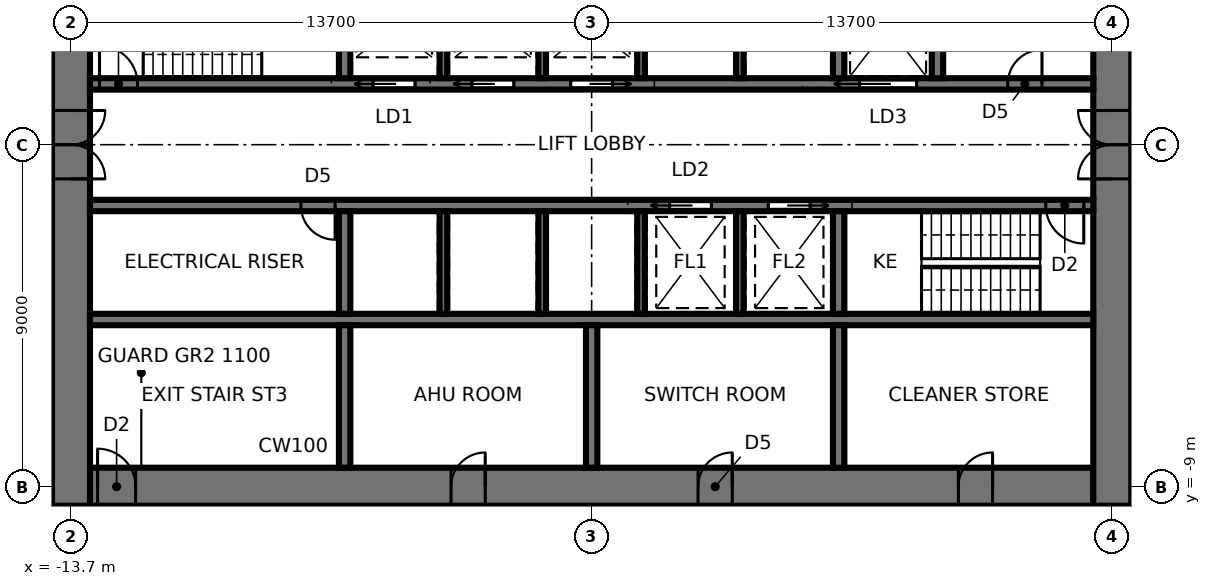
"""IFC4 building model, lengths in metres.
Left out: names, types, materials, properties, quantities, classifications, styles, units other than length and angle.
Written with IfcOpenShell. Run it as: python <this file> out.ifc"""

import sys

from ifc_helpers import new_model, si_unit, direction, frame, frame_2d, origin, place, context, subcontext, project, spatial, rectangle, extrude, element, fill, save


model = new_model("IFC4")
c1 = context("Model", 3, precision=1e-05, world=origin(), true_north=direction((0.0, 1.0)))
c2 = subcontext(c1, "Body", "Model", "MODEL_VIEW")
j1 = project(units=[si_unit("LENGTHUNIT", "METRE"), si_unit("PLANEANGLEUNIT", "RADIAN")], contexts=[c1])
p1 = place(None, origin())
s1 = spatial("IfcSite", under=j1, at=p1, CompositionType="ELEMENT")
p2 = place(p1, origin())
s2 = spatial("IfcBuilding", under=s1, at=p2, CompositionType="ELEMENT")
p3 = place(p2, frame((0.0, 0.0, 15.1)))
s3 = spatial("IfcBuildingStorey", under=s2, at=p3, CompositionType="ELEMENT", Elevation=15.1)
p4 = place(p3, frame((-13.2, -9.0, 0.0), z_axis=(0.0, 0.0, 1.0), x_axis=(1.0, 0.0, 0.0)))
e1 = element("IfcWall", 1, at=p4, inside=s3, PredefinedType="SHEAR", context=c2, shape_type="SweptSolid", body=[
    extrude(rectangle(XDim=26.4, YDim=1.0, at=frame_2d((13.2, 0.0))), origin(), (0.0, 0.0, 1.0), 4.5),
])
p5 = place(p4, frame((0.2, 0.0, 0.0)))
e2 = element("IfcOpeningElement", 2, at=p5, cuts=e1, PredefinedType="OPENING", context=c2, shape_type="SweptSolid", body=[
    extrude(rectangle(XDim=1.0, YDim=2.1, at=frame_2d((0.5, 1.05))), frame((0.0, 0.51, 0.0), z_axis=(0.0, -1.0, 0.0), x_axis=(1.0, 0.0, 0.0)), (0.0, 0.0, 1.0), 1.02),
])
p6 = place(p4, frame((9.5, 0.0, 0.0)))
e3 = element("IfcOpeningElement", 3, at=p6, cuts=e1, PredefinedType="OPENING", context=c2, shape_type="SweptSolid", body=[
    extrude(rectangle(XDim=0.9, YDim=2.1, at=frame_2d((0.45, 1.05))), frame((0.0, 0.51, 0.0), z_axis=(0.0, -1.0, 0.0), x_axis=(1.0, 0.0, 0.0)), (0.0, 0.0, 1.0), 1.02),
])
p7 = place(p4, frame((16.0, 0.0, 0.0)))
e4 = element("IfcOpeningElement", 4, at=p7, cuts=e1, PredefinedType="OPENING", context=c2, shape_type="SweptSolid", body=[
    extrude(rectangle(XDim=0.9, YDim=2.1, at=frame_2d((0.45, 1.05))), frame((0.0, 0.51, 0.0), z_axis=(0.0, -1.0, 0.0), x_axis=(1.0, 0.0, 0.0)), (0.0, 0.0, 1.0), 1.02),
])
p8 = place(p4, frame((22.85, 0.0, 0.0)))
e5 = element("IfcOpeningElement", 5, at=p8, cuts=e1, PredefinedType="OPENING", context=c2, shape_type="SweptSolid", body=[
    extrude(rectangle(XDim=0.9, YDim=2.1, at=frame_2d((0.45, 1.05))), frame((0.0, 0.51, 0.0), z_axis=(0.0, -1.0, 0.0), x_axis=(1.0, 0.0, 0.0)), (0.0, 0.0, 1.0), 1.02),
])
p9 = place(p3, frame((13.7, -9.5, 0.0), z_axis=(0.0, 0.0, 1.0), x_axis=(0.0, 1.0, 0.0)))
e6 = element("IfcWall", 6, at=p9, inside=s3, PredefinedType="SHEAR", context=c2, shape_type="SweptSolid", body=[
    extrude(rectangle(XDim=19.0, YDim=1.0, at=frame_2d((9.5, 0.0))), origin(), (0.0, 0.0, 1.0), 4.5),
])
p10 = place(p9, frame((8.6, 0.0, 0.0)))
e7 = element("IfcOpeningElement", 7, at=p10, cuts=e6, PredefinedType="OPENING", context=c2, shape_type="SweptSolid", body=[
    extrude(rectangle(XDim=1.8, YDim=2.4, at=frame_2d((0.9, 1.2))), frame((0.0, 0.51, 0.0), z_axis=(0.0, -1.0, 0.0), x_axis=(1.0, 0.0, 0.0)), (0.0, 0.0, 1.0), 1.02),
])
p11 = place(p3, frame((-13.7, 9.5, 0.0), z_axis=(0.0, 0.0, 1.0), x_axis=(0.0, -1.0, 0.0)))
e8 = element("IfcWall", 8, at=p11, inside=s3, PredefinedType="SHEAR", context=c2, shape_type="SweptSolid", body=[
    extrude(rectangle(XDim=19.0, YDim=1.0, at=frame_2d((9.5, 0.0))), origin(), (0.0, 0.0, 1.0), 4.5),
])
p12 = place(p11, frame((8.6, 0.0, 0.0)))
e9 = element("IfcOpeningElement", 9, at=p12, cuts=e8, PredefinedType="OPENING", context=c2, shape_type="SweptSolid", body=[
    extrude(rectangle(XDim=1.8, YDim=2.4, at=frame_2d((0.9, 1.2))), frame((0.0, 0.51, 0.0), z_axis=(0.0, -1.0, 0.0), x_axis=(1.0, 0.0, 0.0)), (0.0, 0.0, 1.0), 1.02),
])
p13 = place(p3, frame((-13.2, 1.6, 0.0), z_axis=(0.0, 0.0, 1.0), x_axis=(1.0, 0.0, 0.0)))
e10 = element("IfcWall", 10, at=p13, inside=s3, PredefinedType="SHEAR", context=c2, shape_type="SweptSolid", body=[
    extrude(rectangle(XDim=26.4, YDim=0.3, at=frame_2d((13.2, 0.0))), origin(), (0.0, 0.0, 1.0), 4.5),
])
p14 = place(p13, frame((0.25, 0.0, 0.0)))
e11 = element("IfcOpeningElement", 11, at=p14, cuts=e10, PredefinedType="OPENING", context=c2, shape_type="SweptSolid", body=[
    extrude(rectangle(XDim=1.0, YDim=2.1, at=frame_2d((0.5, 1.05))), frame((0.0, 0.16, 0.0), z_axis=(0.0, -1.0, 0.0), x_axis=(1.0, 0.0, 0.0)), (0.0, 0.0, 1.0), 0.32),
])
p15 = place(p13, frame((20.25, 0.0, 0.0)))
e12 = element("IfcOpeningElement", 12, at=p15, cuts=e10, PredefinedType="OPENING", context=c2, shape_type="SweptSolid", body=[
    extrude(rectangle(XDim=1.5, YDim=2.4, at=frame_2d((0.75, 1.2))), frame((0.0, 0.16, 0.0), z_axis=(0.0, -1.0, 0.0), x_axis=(1.0, 0.0, 0.0)), (0.0, 0.0, 1.0), 0.32),
])
p16 = place(p13, frame((7.45, 0.0, 0.0)))
e13 = element("IfcOpeningElement", 13, at=p16, cuts=e10, PredefinedType="OPENING", context=c2, shape_type="SweptSolid", body=[
    extrude(rectangle(XDim=1.1, YDim=2.3, at=frame_2d((0.55, 1.15))), frame((0.0, 0.16, 0.0), z_axis=(0.0, -1.0, 0.0), x_axis=(1.0, 0.0, 0.0)), (0.0, 0.0, 1.0), 0.32),
])
p17 = place(p13, frame((10.05, 0.0, 0.0)))
e14 = element("IfcOpeningElement", 14, at=p17, cuts=e10, PredefinedType="OPENING", context=c2, shape_type="SweptSolid", body=[
    extrude(rectangle(XDim=1.1, YDim=2.3, at=frame_2d((0.55, 1.15))), frame((0.0, 0.16, 0.0), z_axis=(0.0, -1.0, 0.0), x_axis=(1.0, 0.0, 0.0)), (0.0, 0.0, 1.0), 0.32),
])
p18 = place(p13, frame((12.65, 0.0, 0.0)))
e15 = element("IfcOpeningElement", 15, at=p18, cuts=e10, PredefinedType="OPENING", context=c2, shape_type="SweptSolid", body=[
    extrude(rectangle(XDim=1.1, YDim=2.3, at=frame_2d((0.55, 1.15))), frame((0.0, 0.16, 0.0), z_axis=(0.0, -1.0, 0.0), x_axis=(1.0, 0.0, 0.0)), (0.0, 0.0, 1.0), 0.32),
])
p19 = place(p13, frame((24.15, 0.0, 0.0)))
e16 = element("IfcOpeningElement", 16, at=p19, cuts=e10, PredefinedType="OPENING", context=c2, shape_type="SweptSolid", body=[
    extrude(rectangle(XDim=0.9, YDim=2.1, at=frame_2d((0.45, 1.05))), frame((0.0, 0.16, 0.0), z_axis=(0.0, -1.0, 0.0), x_axis=(1.0, 0.0, 0.0)), (0.0, 0.0, 1.0), 0.32),
])
p20 = place(p3, frame((-13.2, -1.6, 0.0), z_axis=(0.0, 0.0, 1.0), x_axis=(1.0, 0.0, 0.0)))
e17 = element("IfcWall", 17, at=p20, inside=s3, PredefinedType="SHEAR", context=c2, shape_type="SweptSolid", body=[
    extrude(rectangle(XDim=26.4, YDim=0.3, at=frame_2d((13.2, 0.0))), origin(), (0.0, 0.0, 1.0), 4.5),
])
p21 = place(p20, frame((25.15, 0.0, 0.0)))
e18 = element("IfcOpeningElement", 18, at=p21, cuts=e17, PredefinedType="OPENING", context=c2, shape_type="SweptSolid", body=[
    extrude(rectangle(XDim=1.0, YDim=2.1, at=frame_2d((0.5, 1.05))), frame((0.0, 0.16, 0.0), z_axis=(0.0, -1.0, 0.0), x_axis=(1.0, 0.0, 0.0)), (0.0, 0.0, 1.0), 0.32),
])
p22 = place(p20, frame((15.25, 0.0, 0.0)))
e19 = element("IfcOpeningElement", 19, at=p22, cuts=e17, PredefinedType="OPENING", context=c2, shape_type="SweptSolid", body=[
    extrude(rectangle(XDim=1.1, YDim=2.3, at=frame_2d((0.55, 1.15))), frame((0.0, 0.16, 0.0), z_axis=(0.0, -1.0, 0.0), x_axis=(1.0, 0.0, 0.0)), (0.0, 0.0, 1.0), 0.32),
])
p23 = place(p20, frame((17.85, 0.0, 0.0)))
e20 = element("IfcOpeningElement", 20, at=p23, cuts=e17, PredefinedType="OPENING", context=c2, shape_type="SweptSolid", body=[
    extrude(rectangle(XDim=1.1, YDim=2.3, at=frame_2d((0.55, 1.15))), frame((0.0, 0.16, 0.0), z_axis=(0.0, -1.0, 0.0), x_axis=(1.0, 0.0, 0.0)), (0.0, 0.0, 1.0), 0.32),
])
p24 = place(p20, frame((5.55, 0.0, 0.0)))
e21 = element("IfcOpeningElement", 21, at=p24, cuts=e17, PredefinedType="OPENING", context=c2, shape_type="SweptSolid", body=[
    extrude(rectangle(XDim=0.9, YDim=2.1, at=frame_2d((0.45, 1.05))), frame((0.0, 0.16, 0.0), z_axis=(0.0, -1.0, 0.0), x_axis=(1.0, 0.0, 0.0)), (0.0, 0.0, 1.0), 0.32),
])
p25 = place(p3, frame((-13.2, -4.6, 0.0), z_axis=(0.0, 0.0, 1.0), x_axis=(1.0, 0.0, 0.0)))
e22 = element("IfcWall", 22, at=p25, inside=s3, PredefinedType="SHEAR", context=c2, shape_type="SweptSolid", body=[
    extrude(rectangle(XDim=26.4, YDim=0.3, at=frame_2d((13.2, 0.0))), origin(), (0.0, 0.0, 1.0), 4.5),
])
for number, where, z_axis, x_axis in (
    (23, (-6.5, 1.75, 0.0), (0.0, 0.0, 1.0), (0.0, 1.0, 0.0)),
    (24, (6.5, 1.75, 0.0), (0.0, 0.0, 1.0), (0.0, 1.0, 0.0)),
):
    element("IfcWall", number, at=place(p3, frame(where, z_axis=z_axis, x_axis=x_axis)), inside=s3, PredefinedType="SHEAR", context=c2, shape_type="SweptSolid", body=[
        extrude(rectangle(XDim=2.7, YDim=0.3, at=frame_2d((1.35, 0.0))), origin(), (0.0, 0.0, 1.0), 4.5),
    ])
for number, where, z_axis, x_axis in (
    (25, (-3.9, 1.75, 0.0), (0.0, 0.0, 1.0), (0.0, 1.0, 0.0)),
    (26, (-1.3, 1.75, 0.0), (0.0, 0.0, 1.0), (0.0, 1.0, 0.0)),
    (27, (1.3, 1.75, 0.0), (0.0, 0.0, 1.0), (0.0, 1.0, 0.0)),
    (28, (3.9, 1.75, 0.0), (0.0, 0.0, 1.0), (0.0, 1.0, 0.0)),
):
    element("IfcWall", number, at=place(p3, frame(where, z_axis=z_axis, x_axis=x_axis)), inside=s3, PredefinedType="SHEAR", context=c2, shape_type="SweptSolid", body=[
        extrude(rectangle(XDim=2.7, YDim=0.2, at=frame_2d((1.35, 0.0))), origin(), (0.0, 0.0, 1.0), 4.5),
    ])
p26 = place(p3, frame((-6.5, -1.75, 0.0), z_axis=(0.0, 0.0, 1.0), x_axis=(0.0, -1.0, 0.0)))
e29 = element("IfcWall", 29, at=p26, inside=s3, PredefinedType="SHEAR", context=c2, shape_type="SweptSolid", body=[
    extrude(rectangle(XDim=2.7, YDim=0.3, at=frame_2d((1.35, 0.0))), origin(), (0.0, 0.0, 1.0), 4.5),
])
p27 = place(p3, frame((-6.5, -4.75, 0.0), z_axis=(0.0, 0.0, 1.0), x_axis=(0.0, -1.0, 0.0)))
e30 = element("IfcWall", 30, at=p27, inside=s3, PredefinedType="SHEAR", context=c2, shape_type="SweptSolid", body=[
    extrude(rectangle(XDim=3.75, YDim=0.3, at=frame_2d((1.875, 0.0))), origin(), (0.0, 0.0, 1.0), 4.5),
])
p28 = place(p3, frame((6.5, -1.75, 0.0), z_axis=(0.0, 0.0, 1.0), x_axis=(0.0, -1.0, 0.0)))
e31 = element("IfcWall", 31, at=p28, inside=s3, PredefinedType="SHEAR", context=c2, shape_type="SweptSolid", body=[
    extrude(rectangle(XDim=2.7, YDim=0.3, at=frame_2d((1.35, 0.0))), origin(), (0.0, 0.0, 1.0), 4.5),
])
p29 = place(p3, frame((6.5, -4.75, 0.0), z_axis=(0.0, 0.0, 1.0), x_axis=(0.0, -1.0, 0.0)))
e32 = element("IfcWall", 32, at=p29, inside=s3, PredefinedType="SHEAR", context=c2, shape_type="SweptSolid", body=[
    extrude(rectangle(XDim=3.75, YDim=0.3, at=frame_2d((1.875, 0.0))), origin(), (0.0, 0.0, 1.0), 4.5),
])
for number, where, z_axis, x_axis in (
    (33, (-3.9, -1.75, 0.0), (0.0, 0.0, 1.0), (0.0, -1.0, 0.0)),
    (34, (-1.3, -1.75, 0.0), (0.0, 0.0, 1.0), (0.0, -1.0, 0.0)),
    (35, (1.3, -1.75, 0.0), (0.0, 0.0, 1.0), (0.0, -1.0, 0.0)),
    (36, (3.9, -1.75, 0.0), (0.0, 0.0, 1.0), (0.0, -1.0, 0.0)),
):
    element("IfcWall", number, at=place(p3, frame(where, z_axis=z_axis, x_axis=x_axis)), inside=s3, PredefinedType="SHEAR", context=c2, shape_type="SweptSolid", body=[
        extrude(rectangle(XDim=2.7, YDim=0.2, at=frame_2d((1.35, 0.0))), origin(), (0.0, 0.0, 1.0), 4.5),
    ])
p30 = place(p3, frame((0.0, -4.75, 0.0), z_axis=(0.0, 0.0, 1.0), x_axis=(0.0, -1.0, 0.0)))
e37 = element("IfcWall", 37, at=p30, inside=s3, PredefinedType="SHEAR", context=c2, shape_type="SweptSolid", body=[
    extrude(rectangle(XDim=3.75, YDim=0.3, at=frame_2d((1.875, 0.0))), origin(), (0.0, 0.0, 1.0), 4.5),
])
p31 = place(p3, frame((9.1, 1.75, 0.0), z_axis=(0.0, 0.0, 1.0), x_axis=(0.0, 1.0, 0.0)))
e38 = element("IfcWall", 38, at=p31, inside=s3, PredefinedType="SHEAR", context=c2, shape_type="SweptSolid", body=[
    extrude(rectangle(XDim=2.7, YDim=0.3, at=frame_2d((1.35, 0.0))), origin(), (0.0, 0.0, 1.0), 4.5),
])
p32 = place(p12, origin())
e39 = element("IfcDoor", 39, at=p32, inside=s3, OperationType="DOUBLE_DOOR_SINGLE_SWING", PredefinedType="DOOR", context=c2, shape_type="SweptSolid", body=[
    extrude(rectangle(XDim=1.72, YDim=2.36, at=frame_2d((0.9, 1.18))), frame((0.0, 0.025, 0.0), z_axis=(0.0, -1.0, 0.0), x_axis=(1.0, 0.0, 0.0)), (0.0, 0.0, 1.0), 0.05),
    extrude(rectangle(XDim=0.04, YDim=2.4, at=frame_2d((0.02, 1.2))), frame((0.0, 0.25, 0.0), z_axis=(0.0, -1.0, 0.0), x_axis=(1.0, 0.0, 0.0)), (0.0, 0.0, 1.0), 0.5),
    extrude(rectangle(XDim=0.04, YDim=2.4, at=frame_2d((1.78, 1.2))), frame((0.0, 0.25, 0.0), z_axis=(0.0, -1.0, 0.0), x_axis=(1.0, 0.0, 0.0)), (0.0, 0.0, 1.0), 0.5),
    extrude(rectangle(XDim=1.72, YDim=0.04, at=frame_2d((0.9, 2.38))), frame((0.0, 0.25, 0.0), z_axis=(0.0, -1.0, 0.0), x_axis=(1.0, 0.0, 0.0)), (0.0, 0.0, 1.0), 0.5),
])
fill(e9, e39)
p33 = place(p10, origin())
e40 = element("IfcDoor", 40, at=p33, inside=s3, OperationType="DOUBLE_DOOR_SINGLE_SWING", PredefinedType="DOOR", context=c2, shape_type="SweptSolid", body=[
    extrude(rectangle(XDim=1.72, YDim=2.36, at=frame_2d((0.9, 1.18))), frame((0.0, 0.025, 0.0), z_axis=(0.0, -1.0, 0.0), x_axis=(1.0, 0.0, 0.0)), (0.0, 0.0, 1.0), 0.05),
    extrude(rectangle(XDim=0.04, YDim=2.4, at=frame_2d((0.02, 1.2))), frame((0.0, 0.25, 0.0), z_axis=(0.0, -1.0, 0.0), x_axis=(1.0, 0.0, 0.0)), (0.0, 0.0, 1.0), 0.5),
    extrude(rectangle(XDim=0.04, YDim=2.4, at=frame_2d((1.78, 1.2))), frame((0.0, 0.25, 0.0), z_axis=(0.0, -1.0, 0.0), x_axis=(1.0, 0.0, 0.0)), (0.0, 0.0, 1.0), 0.5),
    extrude(rectangle(XDim=1.72, YDim=0.04, at=frame_2d((0.9, 2.38))), frame((0.0, 0.25, 0.0), z_axis=(0.0, -1.0, 0.0), x_axis=(1.0, 0.0, 0.0)), (0.0, 0.0, 1.0), 0.5),
])
fill(e7, e40)
p34 = place(p14, origin())
e41 = element("IfcDoor", 41, at=p34, inside=s3, OperationType="SINGLE_SWING_LEFT", PredefinedType="DOOR", context=c2, shape_type="SweptSolid", body=[
    extrude(rectangle(XDim=1.0, YDim=2.1, at=frame_2d((0.5, 1.05))), frame((0.0, 0.025, 0.0), z_axis=(0.0, -1.0, 0.0), x_axis=(1.0, 0.0, 0.0)), (0.0, 0.0, 1.0), 0.05),
])
fill(e11, e41)
p35 = place(p21, frame((1.0, 0.0, 0.0), z_axis=(0.0, 0.0, 1.0), x_axis=(-1.0, 0.0, 0.0)))
e42 = element("IfcDoor", 42, at=p35, inside=s3, OperationType="SINGLE_SWING_LEFT", PredefinedType="DOOR", context=c2, shape_type="SweptSolid", body=[
    extrude(rectangle(XDim=1.0, YDim=2.1, at=frame_2d((0.5, 1.05))), frame((0.0, 0.025, 0.0), z_axis=(0.0, -1.0, 0.0), x_axis=(1.0, 0.0, 0.0)), (0.0, 0.0, 1.0), 0.05),
])
fill(e18, e42)
p36 = place(p5, origin())
e43 = element("IfcDoor", 43, at=p36, inside=s3, OperationType="SINGLE_SWING_LEFT", PredefinedType="DOOR", context=c2, shape_type="SweptSolid", body=[
    extrude(rectangle(XDim=0.92, YDim=2.06, at=frame_2d((0.5, 1.03))), frame((0.0, 0.025, 0.0), z_axis=(0.0, -1.0, 0.0), x_axis=(1.0, 0.0, 0.0)), (0.0, 0.0, 1.0), 0.05),
    extrude(rectangle(XDim=0.04, YDim=2.1, at=frame_2d((0.02, 1.05))), frame((0.0, 0.25, 0.0), z_axis=(0.0, -1.0, 0.0), x_axis=(1.0, 0.0, 0.0)), (0.0, 0.0, 1.0), 0.5),
    extrude(rectangle(XDim=0.04, YDim=2.1, at=frame_2d((0.98, 1.05))), frame((0.0, 0.25, 0.0), z_axis=(0.0, -1.0, 0.0), x_axis=(1.0, 0.0, 0.0)), (0.0, 0.0, 1.0), 0.5),
    extrude(rectangle(XDim=0.92, YDim=0.04, at=frame_2d((0.5, 2.08))), frame((0.0, 0.25, 0.0), z_axis=(0.0, -1.0, 0.0), x_axis=(1.0, 0.0, 0.0)), (0.0, 0.0, 1.0), 0.5),
])
fill(e2, e43)
p37 = place(p15, origin())
e44 = element("IfcDoor", 44, at=p37, inside=s3, OperationType="SLIDING_TO_LEFT", PredefinedType="DOOR", context=c2, shape_type="SweptSolid", body=[
    extrude(rectangle(XDim=1.5, YDim=2.4, at=frame_2d((0.75, 1.2))), frame((0.0, 0.025, 0.0), z_axis=(0.0, -1.0, 0.0), x_axis=(1.0, 0.0, 0.0)), (0.0, 0.0, 1.0), 0.05),
])
fill(e12, e44)
p38 = place(p16, origin())
e45 = element("IfcDoor", 45, at=p38, inside=s3, OperationType="SLIDING_TO_LEFT", PredefinedType="DOOR", context=c2, shape_type="SweptSolid", body=[
    extrude(rectangle(XDim=1.1, YDim=2.3, at=frame_2d((0.55, 1.15))), frame((0.0, 0.025, 0.0), z_axis=(0.0, -1.0, 0.0), x_axis=(1.0, 0.0, 0.0)), (0.0, 0.0, 1.0), 0.05),
])
fill(e13, e45)
p39 = place(p17, origin())
e46 = element("IfcDoor", 46, at=p39, inside=s3, OperationType="SLIDING_TO_LEFT", PredefinedType="DOOR", context=c2, shape_type="SweptSolid", body=[
    extrude(rectangle(XDim=1.1, YDim=2.3, at=frame_2d((0.55, 1.15))), frame((0.0, 0.025, 0.0), z_axis=(0.0, -1.0, 0.0), x_axis=(1.0, 0.0, 0.0)), (0.0, 0.0, 1.0), 0.05),
])
fill(e14, e46)
p40 = place(p18, origin())
e47 = element("IfcDoor", 47, at=p40, inside=s3, OperationType="SLIDING_TO_RIGHT", PredefinedType="DOOR", context=c2, shape_type="SweptSolid", body=[
    extrude(rectangle(XDim=1.1, YDim=2.3, at=frame_2d((0.55, 1.15))), frame((0.0, 0.025, 0.0), z_axis=(0.0, -1.0, 0.0), x_axis=(1.0, 0.0, 0.0)), (0.0, 0.0, 1.0), 0.05),
])
fill(e15, e47)
p41 = place(p22, frame((1.1, 0.0, 0.0), z_axis=(0.0, 0.0, 1.0), x_axis=(-1.0, 0.0, 0.0)))
e48 = element("IfcDoor", 48, at=p41, inside=s3, OperationType="SLIDING_TO_RIGHT", PredefinedType="DOOR", context=c2, shape_type="SweptSolid", body=[
    extrude(rectangle(XDim=1.1, YDim=2.3, at=frame_2d((0.55, 1.15))), frame((0.0, 0.025, 0.0), z_axis=(0.0, -1.0, 0.0), x_axis=(1.0, 0.0, 0.0)), (0.0, 0.0, 1.0), 0.05),
])
fill(e19, e48)
p42 = place(p23, frame((1.1, 0.0, 0.0), z_axis=(0.0, 0.0, 1.0), x_axis=(-1.0, 0.0, 0.0)))
e49 = element("IfcDoor", 49, at=p42, inside=s3, OperationType="SLIDING_TO_LEFT", PredefinedType="DOOR", context=c2, shape_type="SweptSolid", body=[
    extrude(rectangle(XDim=1.1, YDim=2.3, at=frame_2d((0.55, 1.15))), frame((0.0, 0.025, 0.0), z_axis=(0.0, -1.0, 0.0), x_axis=(1.0, 0.0, 0.0)), (0.0, 0.0, 1.0), 0.05),
])
fill(e20, e49)
p43 = place(p19, origin())
e50 = element("IfcDoor", 50, at=p43, inside=s3, OperationType="SINGLE_SWING_RIGHT", PredefinedType="DOOR", context=c2, shape_type="SweptSolid", body=[
    extrude(rectangle(XDim=0.9, YDim=2.1, at=frame_2d((0.45, 1.05))), frame((0.0, 0.025, 0.0), z_axis=(0.0, -1.0, 0.0), x_axis=(1.0, 0.0, 0.0)), (0.0, 0.0, 1.0), 0.05),
])
fill(e16, e50)
p44 = place(p24, frame((0.9, 0.0, 0.0), z_axis=(0.0, 0.0, 1.0), x_axis=(-1.0, 0.0, 0.0)))
e51 = element("IfcDoor", 51, at=p44, inside=s3, OperationType="SINGLE_SWING_LEFT", PredefinedType="DOOR", context=c2, shape_type="SweptSolid", body=[
    extrude(rectangle(XDim=0.9, YDim=2.1, at=frame_2d((0.45, 1.05))), frame((0.0, 0.025, 0.0), z_axis=(0.0, -1.0, 0.0), x_axis=(1.0, 0.0, 0.0)), (0.0, 0.0, 1.0), 0.05),
])
fill(e21, e51)
p45 = place(p6, origin())
e52 = element("IfcDoor", 52, at=p45, inside=s3, OperationType="SINGLE_SWING_RIGHT", PredefinedType="DOOR", context=c2, shape_type="SweptSolid", body=[
    extrude(rectangle(XDim=0.82, YDim=2.06, at=frame_2d((0.45, 1.03))), frame((0.0, 0.025, 0.0), z_axis=(0.0, -1.0, 0.0), x_axis=(1.0, 0.0, 0.0)), (0.0, 0.0, 1.0), 0.05),
    extrude(rectangle(XDim=0.04, YDim=2.1, at=frame_2d((0.02, 1.05))), frame((0.0, 0.25, 0.0), z_axis=(0.0, -1.0, 0.0), x_axis=(1.0, 0.0, 0.0)), (0.0, 0.0, 1.0), 0.5),
    extrude(rectangle(XDim=0.04, YDim=2.1, at=frame_2d((0.88, 1.05))), frame((0.0, 0.25, 0.0), z_axis=(0.0, -1.0, 0.0), x_axis=(1.0, 0.0, 0.0)), (0.0, 0.0, 1.0), 0.5),
    extrude(rectangle(XDim=0.82, YDim=0.04, at=frame_2d((0.45, 2.08))), frame((0.0, 0.25, 0.0), z_axis=(0.0, -1.0, 0.0), x_axis=(1.0, 0.0, 0.0)), (0.0, 0.0, 1.0), 0.5),
])
fill(e3, e52)
p46 = place(p7, origin())
e53 = element("IfcDoor", 53, at=p46, inside=s3, OperationType="SINGLE_SWING_RIGHT", PredefinedType="DOOR", context=c2, shape_type="SweptSolid", body=[
    extrude(rectangle(XDim=0.82, YDim=2.06, at=frame_2d((0.45, 1.03))), frame((0.0, 0.025, 0.0), z_axis=(0.0, -1.0, 0.0), x_axis=(1.0, 0.0, 0.0)), (0.0, 0.0, 1.0), 0.05),
    extrude(rectangle(XDim=0.04, YDim=2.1, at=frame_2d((0.02, 1.05))), frame((0.0, 0.25, 0.0), z_axis=(0.0, -1.0, 0.0), x_axis=(1.0, 0.0, 0.0)), (0.0, 0.0, 1.0), 0.5),
    extrude(rectangle(XDim=0.04, YDim=2.1, at=frame_2d((0.88, 1.05))), frame((0.0, 0.25, 0.0), z_axis=(0.0, -1.0, 0.0), x_axis=(1.0, 0.0, 0.0)), (0.0, 0.0, 1.0), 0.5),
    extrude(rectangle(XDim=0.82, YDim=0.04, at=frame_2d((0.45, 2.08))), frame((0.0, 0.25, 0.0), z_axis=(0.0, -1.0, 0.0), x_axis=(1.0, 0.0, 0.0)), (0.0, 0.0, 1.0), 0.5),
])
fill(e4, e53)
p47 = place(p8, origin())
e54 = element("IfcDoor", 54, at=p47, inside=s3, OperationType="SINGLE_SWING_RIGHT", PredefinedType="DOOR", context=c2, shape_type="SweptSolid", body=[
    extrude(rectangle(XDim=0.82, YDim=2.06, at=frame_2d((0.45, 1.03))), frame((0.0, 0.025, 0.0), z_axis=(0.0, -1.0, 0.0), x_axis=(1.0, 0.0, 0.0)), (0.0, 0.0, 1.0), 0.05),
    extrude(rectangle(XDim=0.04, YDim=2.1, at=frame_2d((0.02, 1.05))), frame((0.0, 0.25, 0.0), z_axis=(0.0, -1.0, 0.0), x_axis=(1.0, 0.0, 0.0)), (0.0, 0.0, 1.0), 0.5),
    extrude(rectangle(XDim=0.04, YDim=2.1, at=frame_2d((0.88, 1.05))), frame((0.0, 0.25, 0.0), z_axis=(0.0, -1.0, 0.0), x_axis=(1.0, 0.0, 0.0)), (0.0, 0.0, 1.0), 0.5),
    extrude(rectangle(XDim=0.82, YDim=0.04, at=frame_2d((0.45, 2.08))), frame((0.0, 0.25, 0.0), z_axis=(0.0, -1.0, 0.0), x_axis=(1.0, 0.0, 0.0)), (0.0, 0.0, 1.0), 0.5),
])
fill(e5, e54)
save(model, sys.argv[1])
